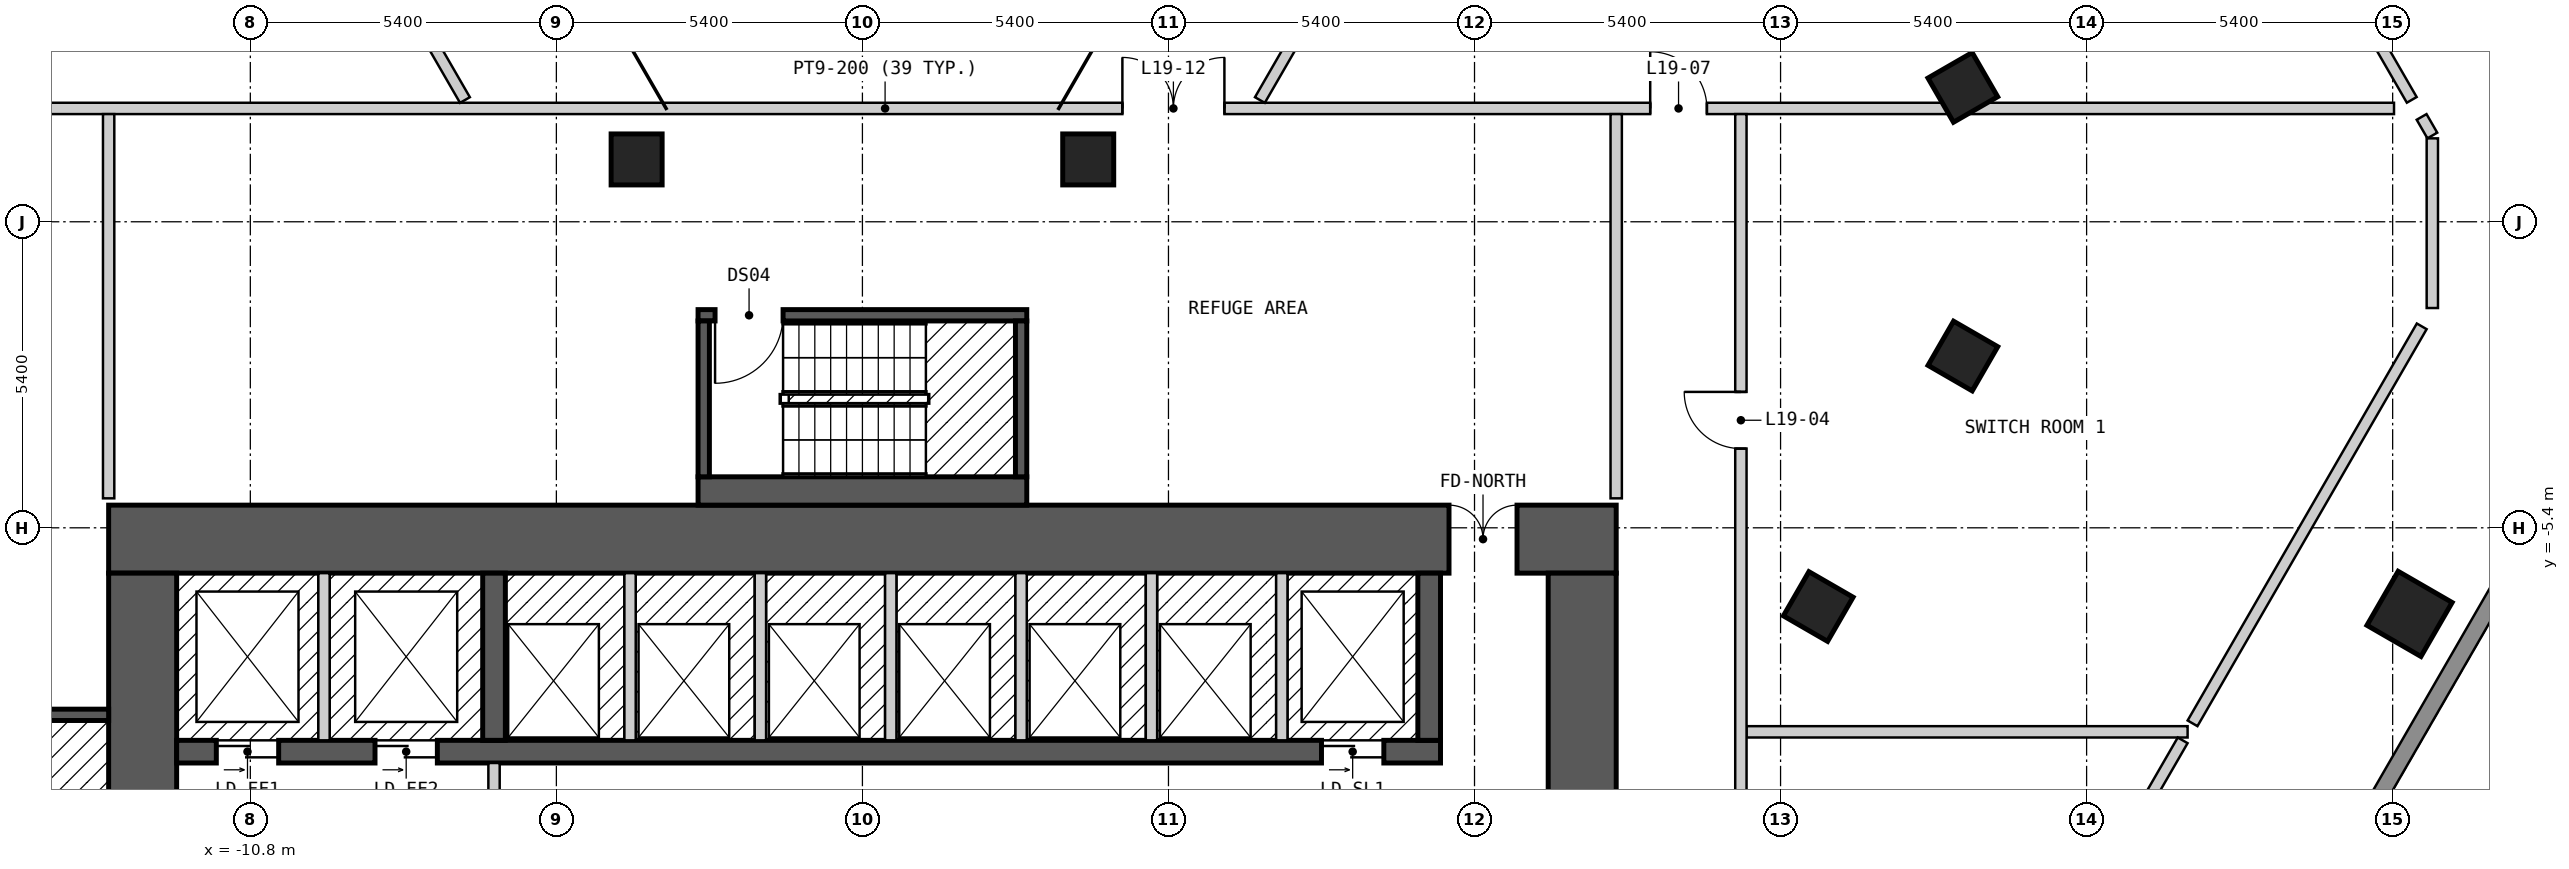
"""IFC4 building model, lengths in metres.
Left out: names, types, materials, properties, quantities, classifications, styles, units other than length and angle.
Written with IfcOpenShell. Run it as: python <this file> out.ifc"""

import sys

from ifc_helpers import new_model, si_unit, direction, frame, frame_2d, origin, origin_2d, place, context, subcontext, project, spatial, polyline, rectangle, outline, extrude, element, fill, save


model = new_model("IFC4")
c1 = context("Model", 3, precision=1e-05, world=origin(), true_north=direction((0.0, 1.0)))
c2 = subcontext(c1, "Body", "Model", "MODEL_VIEW")
j1 = project(units=[si_unit("LENGTHUNIT", "METRE"), si_unit("PLANEANGLEUNIT", "RADIAN")], contexts=[c1])
p1 = place(None, origin())
s1 = spatial("IfcSite", under=j1, at=p1, CompositionType="ELEMENT")
p2 = place(p1, origin())
s2 = spatial("IfcBuilding", under=s1, at=p2, CompositionType="ELEMENT")
p3 = place(p2, frame((0.0, 0.0, 62.4)))
s3 = spatial("IfcBuildingStorey", under=s2, at=p3, CompositionType="ELEMENT", Elevation=62.4)
p4 = place(p3, frame((27.298, -6.919, 0.0), z_axis=(0.0, 0.0, 1.0), x_axis=(0.499984884929, 0.866034130299, 0.0)))
e1 = element("IfcColumn", 1, at=p4, inside=s3, PredefinedType="COLUMN", context=c2, shape_type="SweptSolid", body=[
    extrude(rectangle(XDim=1.1, YDim=1.1, at=origin_2d()), origin(), (0.0, 0.0, 1.0), 2.6),
])
for number, where, z_axis, x_axis in (
    (2, (16.865, -6.789, 0.0), (0.0, 0.0, 1.0), (0.5, 0.866, 0.0)),
    (3, (19.417, -2.369, 0.0), (0.0, 0.0, 1.0), (0.5, 0.866, 0.0)),
):
    element("IfcColumn", number, at=place(p3, frame(where, z_axis=z_axis, x_axis=x_axis)), inside=s3, PredefinedType="COLUMN", context=c2, shape_type="SweptSolid", body=[
        extrude(rectangle(XDim=0.9, YDim=0.9, at=origin_2d()), origin(), (0.0, 0.0, 1.0), 2.6),
    ])
for number, where, z_axis, x_axis in (
    (4, (19.416, 2.371, 0.0), (0.0, 0.0, 1.0), (-0.5, 0.866, 0.0)),
    (5, (3.984, 1.1, 0.0), (0.0, 0.0, 1.0), (1.0, 0.0, 0.0)),
    (6, (-3.984, 1.1, 0.0), (0.0, 0.0, 1.0), (1.0, 0.0, 0.0)),
):
    element("IfcColumn", number, at=place(p3, frame(where, z_axis=z_axis, x_axis=x_axis)), inside=s3, PredefinedType="COLUMN", context=c2, shape_type="SweptSolid", body=[
        extrude(rectangle(XDim=0.9, YDim=0.9, at=origin_2d()), origin(), (0.0, 0.0, 1.0), 3.6),
    ])
p5 = place(p3, frame((-13.3, -5.6, 0.0), z_axis=(0.0, 0.0, 1.0), x_axis=(1.0, 0.0, 0.0)))
e7 = element("IfcWall", 7, at=p5, inside=s3, PredefinedType="SHEAR", context=c2, shape_type="SweptSolid", body=[
    extrude(rectangle(XDim=26.6, YDim=1.2, at=frame_2d((13.3, 0.0))), origin(), (0.0, 0.0, 1.0), 2.6),
])
p6 = place(p5, frame((23.65, 0.0, 0.0)))
e8 = element("IfcOpeningElement", 8, at=p6, cuts=e7, PredefinedType="OPENING", context=c2, shape_type="SweptSolid", body=[
    extrude(rectangle(XDim=1.2, YDim=2.1, at=frame_2d((0.6, 1.05))), frame((0.0, 0.61, 0.0), z_axis=(0.0, -1.0, 0.0), x_axis=(1.0, 0.0, 0.0)), (0.0, 0.0, 1.0), 1.22),
])
p7 = place(p3, frame((-12.7, -17.8, 0.0), z_axis=(0.0, 0.0, 1.0), x_axis=(0.0, 1.0, 0.0)))
e9 = element("IfcWall", 9, at=p7, inside=s3, PredefinedType="SHEAR", context=c2, shape_type="SweptSolid", body=[
    extrude(rectangle(XDim=11.6, YDim=1.2, at=frame_2d((5.8, 0.0))), origin(), (0.0, 0.0, 1.0), 2.6),
])
p8 = place(p7, frame((3.6, 0.0, 0.0)))
e10 = element("IfcOpeningElement", 10, at=p8, cuts=e9, PredefinedType="OPENING", context=c2, shape_type="SweptSolid", body=[
    extrude(rectangle(XDim=1.2, YDim=2.1, at=frame_2d((0.6, 1.05))), frame((0.0, 0.61, 0.0), z_axis=(0.0, -1.0, 0.0), x_axis=(1.0, 0.0, 0.0)), (0.0, 0.0, 1.0), 1.22),
])
p9 = place(p3, frame((12.7, -17.8, 0.0), z_axis=(0.0, 0.0, 1.0), x_axis=(0.0, 1.0, 0.0)))
e11 = element("IfcWall", 11, at=p9, inside=s3, PredefinedType="SHEAR", context=c2, shape_type="SweptSolid", body=[
    extrude(rectangle(XDim=11.6, YDim=1.2, at=frame_2d((5.8, 0.0))), origin(), (0.0, 0.0, 1.0), 2.6),
])
p10 = place(p3, frame((-12.1, -9.35, 0.0), z_axis=(0.0, 0.0, 1.0), x_axis=(1.0, 0.0, 0.0)))
e12 = element("IfcWall", 12, at=p10, inside=s3, PredefinedType="SHEAR", context=c2, shape_type="SweptSolid", body=[
    extrude(rectangle(XDim=22.3, YDim=0.4, at=frame_2d((11.15, 0.0))), origin(), (0.0, 0.0, 1.0), 2.6),
])
p11 = place(p10, frame((0.7, 0.0, 0.0)))
e13 = element("IfcOpeningElement", 13, at=p11, cuts=e12, PredefinedType="OPENING", context=c2, shape_type="SweptSolid", body=[
    extrude(rectangle(XDim=1.1, YDim=2.1, at=frame_2d((0.55, 1.05))), frame((0.0, 0.21, 0.0), z_axis=(0.0, -1.0, 0.0), x_axis=(1.0, 0.0, 0.0)), (0.0, 0.0, 1.0), 0.42),
])
p12 = place(p10, frame((3.5, 0.0, 0.0)))
e14 = element("IfcOpeningElement", 14, at=p12, cuts=e12, PredefinedType="OPENING", context=c2, shape_type="SweptSolid", body=[
    extrude(rectangle(XDim=1.1, YDim=2.1, at=frame_2d((0.55, 1.05))), frame((0.0, 0.21, 0.0), z_axis=(0.0, -1.0, 0.0), x_axis=(1.0, 0.0, 0.0)), (0.0, 0.0, 1.0), 0.42),
])
p13 = place(p10, frame((20.2, 0.0, 0.0)))
e15 = element("IfcOpeningElement", 15, at=p13, cuts=e12, PredefinedType="OPENING", context=c2, shape_type="SweptSolid", body=[
    extrude(rectangle(XDim=1.1, YDim=2.1, at=frame_2d((0.55, 1.05))), frame((0.0, 0.21, 0.0), z_axis=(0.0, -1.0, 0.0), x_axis=(1.0, 0.0, 0.0)), (0.0, 0.0, 1.0), 0.42),
])
for number, where, z_axis, x_axis in (
    (16, (-6.5, -9.15, 0.0), (0.0, 0.0, 1.0), (0.0, 1.0, 0.0)),
    (17, (10.0, -9.15, 0.0), (0.0, 0.0, 1.0), (0.0, 1.0, 0.0)),
):
    element("IfcWall", number, at=place(p3, frame(where, z_axis=z_axis, x_axis=x_axis)), inside=s3, PredefinedType="SHEAR", context=c2, shape_type="SweptSolid", body=[
        extrude(rectangle(XDim=2.95, YDim=0.4, at=frame_2d((1.475, 0.0))), origin(), (0.0, 0.0, 1.0), 2.6),
    ])
for number, where, z_axis, x_axis in (
    (18, (17.71, -25.825, 0.0), (0.0, 0.0, 1.0), (0.5, 0.866, 0.0)),
    (19, (31.22, 2.425, 0.0), (0.0, 0.0, 1.0), (-0.5, 0.866, 0.0)),
):
    element("IfcWall", number, at=place(p3, frame(where, z_axis=z_axis, x_axis=x_axis)), inside=s3, PredefinedType="SOLIDWALL", context=c2, shape_type="SweptSolid", body=[
        extrude(outline(polyline([(0.0, -0.15), (27.02, -0.15), (26.94, 0.15), (0.08, 0.15), (0.0, -0.15)])), origin(), (0.0, 0.0, 1.0), 2.6),
    ])
p14 = place(p3, frame((-2.9, -4.75, 0.0), z_axis=(0.0, 0.0, 1.0), x_axis=(1.0, 0.0, 0.0)))
e20 = element("IfcWall", 20, at=p14, inside=s3, PredefinedType="SOLIDWALL", context=c2, shape_type="SweptSolid", body=[
    extrude(rectangle(XDim=5.8, YDim=0.5, at=frame_2d((2.9, 0.0))), origin(), (0.0, 0.0, 1.0), 2.6),
])
p15 = place(p3, frame((-2.9, -1.65, 0.0), z_axis=(0.0, 0.0, 1.0), x_axis=(1.0, 0.0, 0.0)))
e21 = element("IfcWall", 21, at=p15, inside=s3, PredefinedType="SOLIDWALL", context=c2, shape_type="SweptSolid", body=[
    extrude(rectangle(XDim=5.8, YDim=0.2, at=frame_2d((2.9, 0.0))), origin(), (0.0, 0.0, 1.0), 2.6),
])
p16 = place(p15, frame((0.3, 0.0, 0.0)))
e22 = element("IfcOpeningElement", 22, at=p16, cuts=e21, PredefinedType="OPENING", context=c2, shape_type="SweptSolid", body=[
    extrude(rectangle(XDim=1.2, YDim=2.1, at=frame_2d((0.6, 1.05))), frame((0.0, 0.11, 0.0), z_axis=(0.0, -1.0, 0.0), x_axis=(1.0, 0.0, 0.0)), (0.0, 0.0, 1.0), 0.22),
])
for number, where, z_axis, x_axis in (
    (23, (-2.8, -4.5, 0.0), (0.0, 0.0, 1.0), (0.0, 1.0, 0.0)),
    (24, (2.8, -4.5, 0.0), (0.0, 0.0, 1.0), (0.0, 1.0, 0.0)),
):
    element("IfcWall", number, at=place(p3, frame(where, z_axis=z_axis, x_axis=x_axis)), inside=s3, PredefinedType="SOLIDWALL", context=c2, shape_type="SweptSolid", body=[
        extrude(rectangle(XDim=2.75, YDim=0.2, at=frame_2d((1.375, 0.0))), origin(), (0.0, 0.0, 1.0), 2.6),
    ])
p17 = place(p3, frame((15.6, -9.0, 0.0), z_axis=(0.0, 0.0, 1.0), x_axis=(1.0, 0.0, 0.0)))
e25 = element("IfcWall", 25, at=p17, inside=s3, PredefinedType="SOLIDWALL", context=c2, shape_type="SweptSolid", body=[
    extrude(rectangle(XDim=7.782, YDim=0.2, at=frame_2d((3.891, 0.0))), origin(), (0.0, 0.0, 1.0), 2.6),
])
p18 = place(p3, frame((-26.224, 2.0, 0.0), z_axis=(0.0, 0.0, 1.0), x_axis=(1.0, 0.0, 0.0)))
e26 = element("IfcWall", 26, at=p18, inside=s3, PredefinedType="SOLIDWALL", context=c2, shape_type="SweptSolid", body=[
    extrude(rectangle(XDim=53.248, YDim=0.2, at=frame_2d((26.624, 0.0))), origin(), (0.0, 0.0, 1.0), 2.6),
])
p19 = place(p18, frame((9.188, 0.0, 0.0)))
e27 = element("IfcOpeningElement", 27, at=p19, cuts=e26, PredefinedType="OPENING", context=c2, shape_type="SweptSolid", body=[
    extrude(rectangle(XDim=1.8, YDim=2.1, at=frame_2d((0.9, 1.05))), frame((0.0, 0.11, 0.0), z_axis=(0.0, -1.0, 0.0), x_axis=(1.0, 0.0, 0.0)), (0.0, 0.0, 1.0), 0.22),
])
p20 = place(p18, frame((40.124, 0.0, 0.0)))
e28 = element("IfcOpeningElement", 28, at=p20, cuts=e26, PredefinedType="OPENING", context=c2, shape_type="SweptSolid", body=[
    extrude(rectangle(XDim=1.0, YDim=2.1, at=frame_2d((0.5, 1.05))), frame((0.0, 0.11, 0.0), z_axis=(0.0, -1.0, 0.0), x_axis=(1.0, 0.0, 0.0)), (0.0, 0.0, 1.0), 0.22),
])
p21 = place(p18, frame((30.811, 0.0, 0.0)))
e29 = element("IfcOpeningElement", 29, at=p21, cuts=e26, PredefinedType="OPENING", context=c2, shape_type="SweptSolid", body=[
    extrude(rectangle(XDim=1.8, YDim=2.1, at=frame_2d((0.9, 1.05))), frame((0.0, 0.11, 0.0), z_axis=(0.0, -1.0, 0.0), x_axis=(1.0, 0.0, 0.0)), (0.0, 0.0, 1.0), 0.22),
])
for number, where, z_axis, x_axis in (
    (30, (-13.3, -4.88, 0.0), (0.0, 0.0, 1.0), (0.0, 1.0, 0.0)),
    (31, (13.3, -4.88, 0.0), (0.0, 0.0, 1.0), (0.0, 1.0, 0.0)),
):
    element("IfcWall", number, at=place(p3, frame(where, z_axis=z_axis, x_axis=x_axis)), inside=s3, PredefinedType="PARTITIONING", context=c2, shape_type="SweptSolid", body=[
        extrude(rectangle(XDim=6.78, YDim=0.2, at=frame_2d((3.39, 0.0))), origin(), (0.0, 0.0, 1.0), 2.6),
    ])
p22 = place(p3, frame((15.5, -10.494, 0.0), z_axis=(0.0, 0.0, 1.0), x_axis=(0.0, 1.0, 0.0)))
e32 = element("IfcWall", 32, at=p22, inside=s3, PredefinedType="SOLIDWALL", context=c2, shape_type="SweptSolid", body=[
    extrude(rectangle(XDim=12.394, YDim=0.2, at=frame_2d((6.197, 0.0))), origin(), (0.0, 0.0, 1.0), 2.6),
])
p23 = place(p22, frame((7.492, 0.0, 0.0), z_axis=(0.0, 0.0, 1.0), x_axis=(-1.0, 0.0, 0.0)))
e33 = element("IfcOpeningElement", 33, at=p23, cuts=e32, PredefinedType="OPENING", context=c2, shape_type="SweptSolid", body=[
    extrude(rectangle(XDim=1.0, YDim=2.1, at=frame_2d((0.5, 1.05))), frame((0.0, 0.11, 0.0), z_axis=(0.0, -1.0, 0.0), x_axis=(1.0, 0.0, 0.0)), (0.0, 0.0, 1.0), 0.22),
])
p24 = place(p3, frame((27.7, -1.522, 0.0), z_axis=(0.0, 0.0, 1.0), x_axis=(0.0, 1.0, 0.0)))
e34 = element("IfcWall", 34, at=p24, inside=s3, PredefinedType="SOLIDWALL", context=c2, shape_type="SweptSolid", body=[
    extrude(rectangle(XDim=2.994, YDim=0.2, at=frame_2d((1.497, 0.0))), origin(), (0.0, 0.0, 1.0), 2.6),
])
p25 = place(p3, frame((-10.392, 8.0, 0.0), z_axis=(0.0, 0.0, 1.0), x_axis=(0.500051862572, -0.865995458844, 0.0)))
e35 = element("IfcWall", 35, at=p25, inside=s3, PredefinedType="SOLIDWALL", context=c2, shape_type="SweptSolid", body=[
    extrude(rectangle(XDim=6.758, YDim=0.2, at=frame_2d((3.379, 0.0))), origin(), (0.0, 0.0, 1.0), 2.6),
])
p26 = place(p3, frame((15.355, 22.905, 0.0), z_axis=(0.0, 0.0, 1.0), x_axis=(0.499984955192, -0.866034089734, 0.0)))
e36 = element("IfcWall", 36, at=p26, inside=s3, PredefinedType="SOLIDWALL", context=c2, shape_type="SweptSolid", body=[
    extrude(rectangle(XDim=23.965, YDim=0.2, at=frame_2d((11.982, 0.0))), origin(), (0.0, 0.0, 1.0), 2.6),
])
p27 = place(p3, frame((27.511, 1.85, 0.0), z_axis=(0.0, 0.0, 1.0), x_axis=(0.499052486836, -0.866571760088, 0.0)))
e37 = element("IfcWall", 37, at=p27, inside=s3, PredefinedType="SOLIDWALL", context=c2, shape_type="SweptSolid", body=[
    extrude(rectangle(XDim=0.379, YDim=0.2, at=frame_2d((0.189, 0.0))), origin(), (0.0, 0.0, 1.0), 2.6),
])
p28 = place(p3, frame((15.5, -22.652, 0.0), z_axis=(0.0, 0.0, 1.0), x_axis=(0.499972322153, 0.866041383007, 0.0)))
e38 = element("IfcWall", 38, at=p28, inside=s3, PredefinedType="SOLIDWALL", context=c2, shape_type="SweptSolid", body=[
    extrude(rectangle(XDim=15.591, YDim=0.2, at=frame_2d((7.795, 0.0))), origin(), (0.0, 0.0, 1.0), 2.6),
])
p29 = place(p3, frame((23.469, -8.85, 0.0), z_axis=(0.0, 0.0, 1.0), x_axis=(0.499956732914, 0.866050382607, 0.0)))
e39 = element("IfcWall", 39, at=p29, inside=s3, PredefinedType="SOLIDWALL", context=c2, shape_type="SweptSolid", body=[
    extrude(rectangle(XDim=8.089, YDim=0.2, at=frame_2d((4.044, 0.0))), origin(), (0.0, 0.0, 1.0), 2.6),
])
p30 = place(p3, frame((7.013, 2.148, 0.0), z_axis=(0.0, 0.0, 1.0), x_axis=(0.499983511822, 0.866034923029, 0.0)))
e40 = element("IfcWall", 40, at=p30, inside=s3, PredefinedType="SOLIDWALL", context=c2, shape_type="SweptSolid", body=[
    extrude(rectangle(XDim=6.584, YDim=0.2, at=frame_2d((3.292, 0.0))), origin(), (0.0, 0.0, 1.0), 2.6),
])
p31 = place(p3, frame((-16.05, -8.7, 0.0), z_axis=(0.0, 0.0, 1.0), x_axis=(1.0, 0.0, 0.0)))
e41 = element("IfcWall", 41, at=p31, inside=s3, PredefinedType="SOLIDWALL", context=c2, shape_type="SweptSolid", body=[
    extrude(rectangle(XDim=2.75, YDim=0.2, at=frame_2d((1.375, 0.0))), origin(), (0.0, 0.0, 1.0), 2.6),
])
p32 = place(p3, frame((-9.5, -9.15, 0.0), z_axis=(0.0, 0.0, 1.0), x_axis=(0.0, 1.0, 0.0)))
e42 = element("IfcWall", 42, at=p32, inside=s3, PredefinedType="SOLIDWALL", context=c2, shape_type="SweptSolid", body=[
    extrude(rectangle(XDim=2.95, YDim=0.2, at=frame_2d((1.475, 0.0))), origin(), (0.0, 0.0, 1.0), 2.6),
])
p33 = place(p3, frame((-6.5, -14.45, 0.0), z_axis=(0.0, 0.0, 1.0), x_axis=(0.0, 1.0, 0.0)))
e43 = element("IfcWall", 43, at=p33, inside=s3, PredefinedType="PARTITIONING", context=c2, shape_type="SweptSolid", body=[
    extrude(rectangle(XDim=4.9, YDim=0.2, at=frame_2d((2.45, 0.0))), origin(), (0.0, 0.0, 1.0), 2.6),
])
p34 = place(p33, frame((3.15, 0.0, 0.0), z_axis=(0.0, 0.0, 1.0), x_axis=(-1.0, 0.0, 0.0)))
e44 = element("IfcOpeningElement", 44, at=p34, cuts=e43, PredefinedType="OPENING", context=c2, shape_type="SweptSolid", body=[
    extrude(rectangle(XDim=1.4, YDim=2.1, at=frame_2d((0.7, 1.05))), frame((0.0, 0.11, 0.0), z_axis=(0.0, -1.0, 0.0), x_axis=(1.0, 0.0, 0.0)), (0.0, 0.0, 1.0), 0.22),
])
for number, where, z_axis, x_axis in (
    (45, (-4.1, -9.15, 0.0), (0.0, 0.0, 1.0), (0.0, 1.0, 0.0)),
    (46, (-1.8, -9.15, 0.0), (0.0, 0.0, 1.0), (0.0, 1.0, 0.0)),
    (47, (0.5, -9.15, 0.0), (0.0, 0.0, 1.0), (0.0, 1.0, 0.0)),
    (48, (2.8, -9.15, 0.0), (0.0, 0.0, 1.0), (0.0, 1.0, 0.0)),
    (49, (5.1, -9.15, 0.0), (0.0, 0.0, 1.0), (0.0, 1.0, 0.0)),
    (50, (7.4, -9.15, 0.0), (0.0, 0.0, 1.0), (0.0, 1.0, 0.0)),
):
    element("IfcWall", number, at=place(p3, frame(where, z_axis=z_axis, x_axis=x_axis)), inside=s3, PredefinedType="SOLIDWALL", context=c2, shape_type="SweptSolid", body=[
        extrude(rectangle(XDim=2.95, YDim=0.2, at=frame_2d((1.475, 0.0))), origin(), (0.0, 0.0, 1.0), 2.6),
    ])
p35 = place(p16, origin())
e51 = element("IfcDoor", 51, at=p35, inside=s3, OperationType="SINGLE_SWING_LEFT", PredefinedType="DOOR", context=c2, shape_type="SweptSolid", body=[
    extrude(rectangle(XDim=1.2, YDim=2.1, at=frame_2d((0.6, 1.05))), frame((0.0, 0.025, 0.0), z_axis=(0.0, -1.0, 0.0), x_axis=(1.0, 0.0, 0.0)), (0.0, 0.0, 1.0), 0.05),
])
fill(e22, e51)
p36 = place(p23, origin())
e52 = element("IfcDoor", 52, at=p36, inside=s3, OperationType="SINGLE_SWING_LEFT", PredefinedType="DOOR", context=c2, shape_type="SweptSolid", body=[
    extrude(rectangle(XDim=1.0, YDim=2.1, at=frame_2d((0.5, 1.05))), frame((0.0, 0.025, 0.0), z_axis=(0.0, -1.0, 0.0), x_axis=(1.0, 0.0, 0.0)), (0.0, 0.0, 1.0), 0.05),
])
fill(e33, e52)
p37 = place(p20, origin())
e53 = element("IfcDoor", 53, at=p37, inside=s3, OperationType="SINGLE_SWING_LEFT", PredefinedType="DOOR", context=c2, shape_type="SweptSolid", body=[
    extrude(rectangle(XDim=1.0, YDim=2.1, at=frame_2d((0.5, 1.05))), frame((0.0, 0.025, 0.0), z_axis=(0.0, -1.0, 0.0), x_axis=(1.0, 0.0, 0.0)), (0.0, 0.0, 1.0), 0.05),
])
fill(e28, e53)
p38 = place(p21, origin())
e54 = element("IfcDoor", 54, at=p38, inside=s3, OperationType="DOUBLE_DOOR_SINGLE_SWING", PredefinedType="DOOR", context=c2, shape_type="SweptSolid", body=[
    extrude(rectangle(XDim=1.8, YDim=2.1, at=frame_2d((0.9, 1.05))), frame((0.0, 0.025, 0.0), z_axis=(0.0, -1.0, 0.0), x_axis=(1.0, 0.0, 0.0)), (0.0, 0.0, 1.0), 0.05),
])
fill(e29, e54)
p39 = place(p11, origin())
e55 = element("IfcDoor", 55, at=p39, inside=s3, OperationType="DOUBLE_DOOR_SLIDING", PredefinedType="DOOR", context=c2, shape_type="SweptSolid", body=[
    extrude(rectangle(XDim=1.1, YDim=2.1, at=frame_2d((0.55, 1.05))), frame((0.0, 0.025, 0.0), z_axis=(0.0, -1.0, 0.0), x_axis=(1.0, 0.0, 0.0)), (0.0, 0.0, 1.0), 0.05),
])
fill(e13, e55)
p40 = place(p12, origin())
e56 = element("IfcDoor", 56, at=p40, inside=s3, OperationType="DOUBLE_DOOR_SLIDING", PredefinedType="DOOR", context=c2, shape_type="SweptSolid", body=[
    extrude(rectangle(XDim=1.1, YDim=2.1, at=frame_2d((0.55, 1.05))), frame((0.0, 0.025, 0.0), z_axis=(0.0, -1.0, 0.0), x_axis=(1.0, 0.0, 0.0)), (0.0, 0.0, 1.0), 0.05),
])
fill(e14, e56)
p41 = place(p13, origin())
e57 = element("IfcDoor", 57, at=p41, inside=s3, OperationType="DOUBLE_DOOR_SLIDING", PredefinedType="DOOR", context=c2, shape_type="SweptSolid", body=[
    extrude(rectangle(XDim=1.1, YDim=2.1, at=frame_2d((0.55, 1.05))), frame((0.0, 0.025, 0.0), z_axis=(0.0, -1.0, 0.0), x_axis=(1.0, 0.0, 0.0)), (0.0, 0.0, 1.0), 0.05),
])
fill(e15, e57)
p42 = place(p6, origin())
e58 = element("IfcDoor", 58, at=p42, inside=s3, OperationType="DOUBLE_DOOR_SINGLE_SWING", PredefinedType="DOOR", context=c2, shape_type="SweptSolid", body=[
    extrude(rectangle(XDim=1.2, YDim=2.1, at=frame_2d((0.6, 1.05))), frame((0.0, 0.025, 0.0), z_axis=(0.0, -1.0, 0.0), x_axis=(1.0, 0.0, 0.0)), (0.0, 0.0, 1.0), 0.05),
])
fill(e8, e58)
save(model, sys.argv[1])
